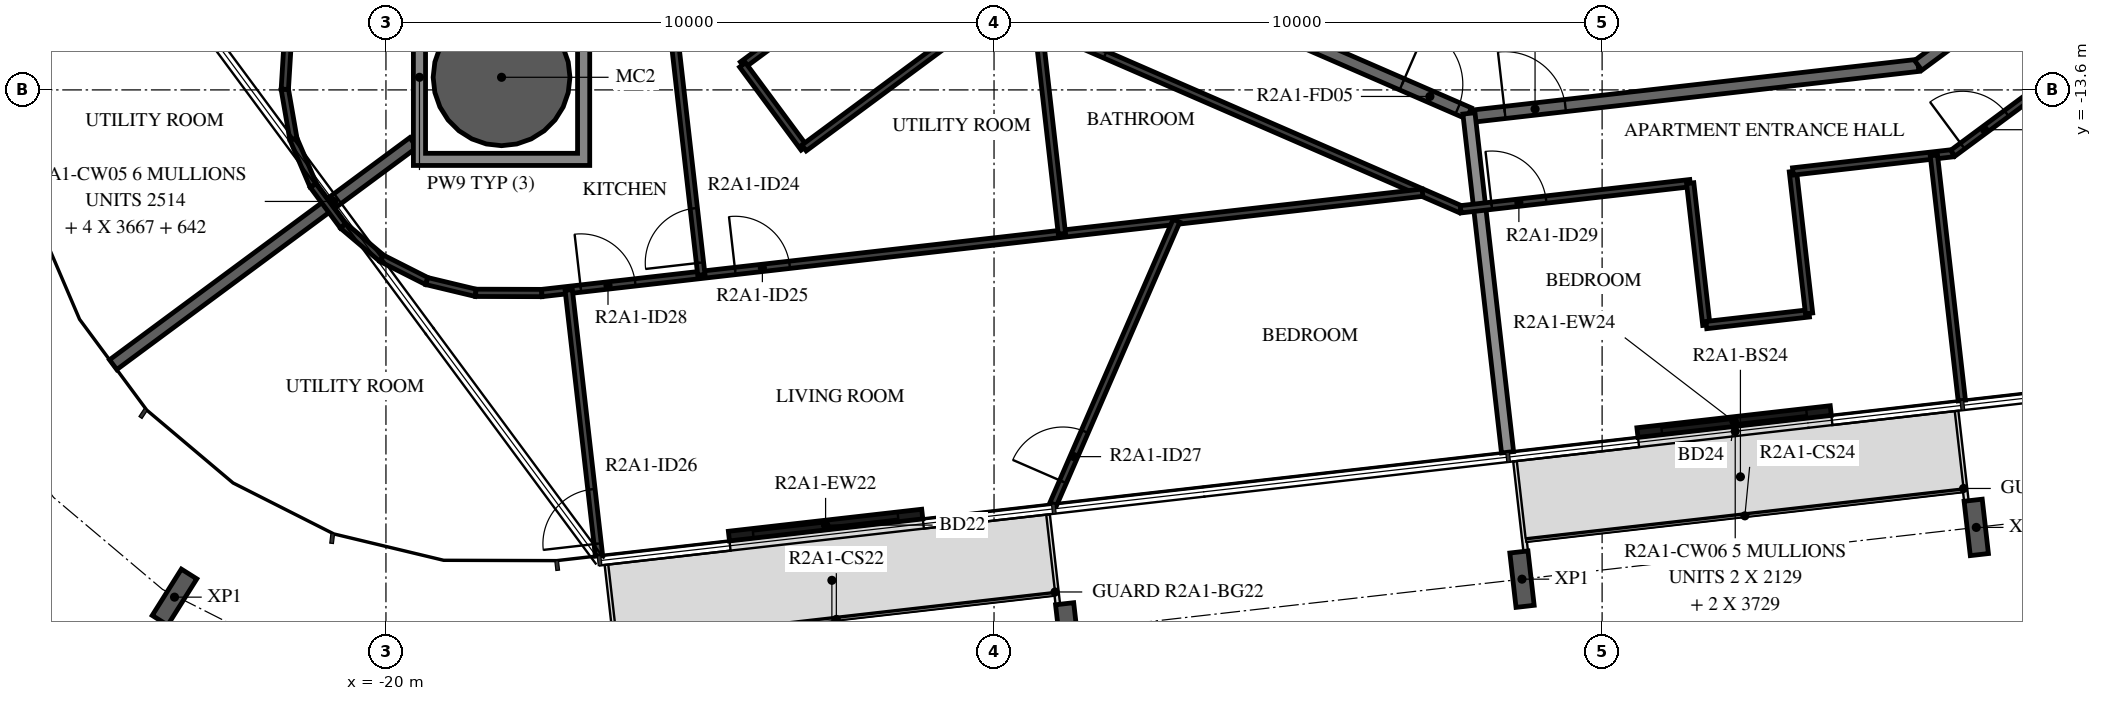
"""IFC4 building model, lengths in metres.
Left out: names, types, materials, properties, quantities, classifications, styles, units other than length and angle.
Written with IfcOpenShell. Run it as: python <this file> out.ifc"""

import sys

from ifc_helpers import new_model, si_unit, direction, frame, frame_2d, origin, origin_2d, place, context, subcontext, project, spatial, polyline, rectangle, hollow_circle, i_section, outline, extrude, element, fill, save


model = new_model("IFC4")
c1 = context("Model", 3, precision=1e-05, world=origin(), true_north=direction((0.0, 1.0)))
c2 = subcontext(c1, "Body", "Model", "MODEL_VIEW")
j1 = project(units=[si_unit("LENGTHUNIT", "METRE"), si_unit("PLANEANGLEUNIT", "RADIAN")], contexts=[c1])
p1 = place(None, origin())
s1 = spatial("IfcSite", under=j1, at=p1, CompositionType="ELEMENT")
p2 = place(p1, origin())
s2 = spatial("IfcBuilding", under=s1, at=p2, CompositionType="ELEMENT")
p3 = place(p2, frame((0.0, 0.0, 80.2)))
s3 = spatial("IfcBuildingStorey", under=s2, at=p3, CompositionType="ELEMENT", Elevation=80.2)
p4 = place(p3, frame((-18.099, -13.393, -0.38), z_axis=(0.0, 0.0, 1.0), x_axis=(1.0, 0.0, 0.0)))
e1 = element("IfcColumn", 1, at=p4, inside=s3, PredefinedType="COLUMN", context=c2, shape_type="SweptSolid", body=[
    extrude(hollow_circle(Radius=1.125, WallThickness=0.055, at=origin_2d()), origin(), (0.0, 0.0, 1.0), 3.5),
])
for number, where, z_axis, x_axis in (
    (2, (6.153, -20.795, -0.38), (0.0, 0.0, 1.0), (-0.994, -0.113, 0.0)),
    (3, (-23.477, -21.941, -0.38), (0.0, 0.0, 1.0), (-0.846, 0.532, 0.0)),
    (4, (-8.788, -22.497, -0.38), (0.0, 0.0, 1.0), (-0.994, -0.113, 0.0)),
    (5, (-1.317, -21.646, -0.38), (0.0, 0.0, 1.0), (-0.994, -0.113, 0.0)),
):
    element("IfcColumn", number, at=place(p3, frame(where, z_axis=z_axis, x_axis=x_axis)), inside=s3, PredefinedType="COLUMN", context=c2, shape_type="SweptSolid", body=[
        extrude(i_section(OverallWidth=0.3, OverallDepth=0.9, WebThickness=0.019, FlangeThickness=0.035, FilletRadius=0.03, at=origin_2d()), origin(), (0.0, 0.0, 1.0), 3.5),
    ])
p5 = place(p3, frame((-14.36, -20.938, 0.0), z_axis=(0.0, 0.0, 1.0), x_axis=(0.993569019005, 0.11322810814, 0.0)))
e6 = element("IfcWall", 6, at=p5, inside=s3, PredefinedType="STANDARD", context=c2, shape_type="SweptSolid", body=[
    extrude(rectangle(XDim=3.2, YDim=0.16, at=frame_2d((1.6, 0.0))), origin(), (0.0, 0.0, 1.0), 3.12),
])
p6 = place(p5, frame((0.4, 0.0, 0.0)))
e7 = element("IfcOpeningElement", 7, at=p6, cuts=e6, PredefinedType="OPENING", context=c2, shape_type="SweptSolid", body=[
    extrude(rectangle(XDim=2.4, YDim=2.4, at=frame_2d((1.2, 1.2))), frame((0.0, 0.09, 0.0), z_axis=(0.0, -1.0, 0.0), x_axis=(1.0, 0.0, 0.0)), (0.0, 0.0, 1.0), 0.18),
])
p7 = place(p3, frame((0.581, -19.235, 0.0), z_axis=(0.0, 0.0, 1.0), x_axis=(0.993569997097, 0.113219525124, 0.0)))
e8 = element("IfcWall", 8, at=p7, inside=s3, PredefinedType="STANDARD", context=c2, shape_type="SweptSolid", body=[
    extrude(rectangle(XDim=3.2, YDim=0.16, at=frame_2d((1.6, 0.0))), origin(), (0.0, 0.0, 1.0), 3.12),
])
p8 = place(p7, frame((0.4, 0.0, 0.0)))
e9 = element("IfcOpeningElement", 9, at=p8, cuts=e8, PredefinedType="OPENING", context=c2, shape_type="SweptSolid", body=[
    extrude(rectangle(XDim=2.4, YDim=2.4, at=frame_2d((1.2, 1.2))), frame((0.0, 0.09, 0.0), z_axis=(0.0, -1.0, 0.0), x_axis=(1.0, 0.0, 0.0)), (0.0, 0.0, 1.0), 0.18),
])
p9 = place(p3, frame((-8.829, -11.1, 0.0), z_axis=(0.0, 0.0, 1.0), x_axis=(0.917063622491, -0.398740908742, 0.0)))
e10 = element("IfcWall", 10, at=p9, inside=s3, PredefinedType="STANDARD", context=c2, shape_type="SweptSolid", body=[
    extrude(rectangle(XDim=7.24, YDim=0.2, at=frame_2d((3.62, 0.0))), origin(), (0.0, 0.0, 1.0), 3.12),
])
p10 = place(p9, frame((6.04, 0.0, 0.0)))
e11 = element("IfcOpeningElement", 11, at=p10, cuts=e10, PredefinedType="OPENING", context=c2, shape_type="SweptSolid", body=[
    extrude(rectangle(XDim=1.0, YDim=2.1, at=frame_2d((0.5, 1.05))), frame((0.0, 0.11, 0.0), z_axis=(0.0, -1.0, 0.0), x_axis=(1.0, 0.0, 0.0)), (0.0, 0.0, 1.0), 0.22),
])
p11 = place(p3, frame((-2.096, -14.028, 0.0), z_axis=(0.0, 0.0, 1.0), x_axis=(0.993569170114, 0.113226782163, 0.0)))
e12 = element("IfcWall", 12, at=p11, inside=s3, PredefinedType="STANDARD", context=c2, shape_type="SweptSolid", body=[
    extrude(rectangle(XDim=7.342, YDim=0.2, at=frame_2d((3.671, 0.0))), origin(), (0.0, 0.0, 1.0), 3.12),
])
p12 = place(p11, frame((0.5, 0.0, 0.0)))
e13 = element("IfcOpeningElement", 13, at=p12, cuts=e12, PredefinedType="OPENING", context=c2, shape_type="SweptSolid", body=[
    extrude(rectangle(XDim=1.0, YDim=2.1, at=frame_2d((0.5, 1.05))), frame((0.0, 0.11, 0.0), z_axis=(0.0, -1.0, 0.0), x_axis=(1.0, 0.0, 0.0)), (0.0, 0.0, 1.0), 0.22),
])
p13 = place(p3, frame((5.198, -13.196, 0.0), z_axis=(0.0, 0.0, 1.0), x_axis=(0.803869883159, 0.594805187394, 0.0)))
e14 = element("IfcWall", 14, at=p13, inside=s3, PredefinedType="STANDARD", context=c2, shape_type="SweptSolid", body=[
    extrude(rectangle(XDim=7.342, YDim=0.2, at=frame_2d((3.671, 0.0))), origin(), (0.0, 0.0, 1.0), 3.12),
])
p14 = place(p3, frame((-24.486, -18.119, 0.0), z_axis=(0.0, 0.0, 1.0), x_axis=(0.80384227933, 0.594842491726, 0.0)))
e15 = element("IfcWall", 15, at=p14, inside=s3, PredefinedType="STANDARD", context=c2, shape_type="SweptSolid", body=[
    extrude(rectangle(XDim=6.142, YDim=0.2, at=frame_2d((3.071, 0.0))), origin(), (0.0, 0.0, 1.0), 3.12),
])
p15 = place(p3, frame((-1.555, -19.559, 0.0), z_axis=(0.0, 0.0, 1.0), x_axis=(-0.113221250863, 0.993569800443, 0.0)))
e16 = element("IfcWall", 16, at=p15, inside=s3, PredefinedType="STANDARD", context=c2, shape_type="SweptSolid", body=[
    extrude(rectangle(XDim=5.609, YDim=0.2, at=frame_2d((2.804, 0.0))), origin(), (0.0, 0.0, 1.0), 2.73),
])
for number, where, z_axis, x_axis in (
    (17, (-20.703, -15.835, 0.0), (0.0, 0.0, 1.0), (-0.595, 0.804, 0.0)),
    (18, (-21.196, -15.168, 0.0), (0.0, 0.0, 1.0), (-0.394, 0.919, 0.0)),
):
    element("IfcWall", number, at=place(p3, frame(where, z_axis=z_axis, x_axis=x_axis)), inside=s3, PredefinedType="PARTITIONING", context=c2, shape_type="SweptSolid", body=[
        extrude(rectangle(XDim=0.829, YDim=0.12, at=frame_2d((0.415, 0.0))), origin(), (0.0, 0.0, 1.0), 3.12),
    ])
p16 = place(p3, frame((-21.522, -14.406, 0.0), z_axis=(0.0, 0.0, 1.0), x_axis=(-0.170794347099, 0.985306698952, 0.0)))
e19 = element("IfcWall", 19, at=p16, inside=s3, PredefinedType="PARTITIONING", context=c2, shape_type="SweptSolid", body=[
    extrude(rectangle(XDim=0.829, YDim=0.12, at=frame_2d((0.415, 0.0))), origin(), (0.0, 0.0, 1.0), 3.12),
])
p17 = place(p3, frame((-21.664, -13.59, 0.0), z_axis=(0.0, 0.0, 1.0), x_axis=(0.061277779288, 0.998120751095, 0.0)))
e20 = element("IfcWall", 20, at=p17, inside=s3, PredefinedType="PARTITIONING", context=c2, shape_type="SweptSolid", body=[
    extrude(rectangle(XDim=0.829, YDim=0.12, at=frame_2d((0.414, 0.0))), origin(), (0.0, 0.0, 1.0), 3.12),
])
p18 = place(p3, frame((-10.914, -10.804, 0.0), z_axis=(0.0, 0.0, 1.0), x_axis=(-0.803864616889, -0.594812304609, 0.0)))
e21 = element("IfcWall", 21, at=p18, inside=s3, PredefinedType="PARTITIONING", context=c2, shape_type="SweptSolid", body=[
    extrude(rectangle(XDim=4.008, YDim=0.12, at=frame_2d((2.004, 0.0))), origin(), (0.0, 0.0, 1.0), 3.12),
])
p19 = place(p3, frame((-14.136, -13.188, 0.0), z_axis=(0.0, 0.0, 1.0), x_axis=(0.594863421241, -0.803826791087, 0.0)))
e22 = element("IfcWall", 22, at=p19, inside=s3, PredefinedType="PARTITIONING", context=c2, shape_type="SweptSolid", body=[
    extrude(rectangle(XDim=1.7, YDim=0.12, at=frame_2d((0.85, 0.0))), origin(), (0.0, 0.0, 1.0), 3.12),
])
p20 = place(p3, frame((-13.125, -14.555, 0.0), z_axis=(0.0, 0.0, 1.0), x_axis=(0.80389374229, 0.594772940799, 0.0)))
e23 = element("IfcWall", 23, at=p20, inside=s3, PredefinedType="PARTITIONING", context=c2, shape_type="SweptSolid", body=[
    extrude(rectangle(XDim=4.008, YDim=0.12, at=frame_2d((2.004, 0.0))), origin(), (0.0, 0.0, 1.0), 3.12),
])
p21 = place(p3, frame((-9.796, -12.315, 0.0), z_axis=(0.0, 0.0, 1.0), x_axis=(0.917059572812, -0.398750222463, 0.0)))
e24 = element("IfcWall", 24, at=p21, inside=s3, PredefinedType="PARTITIONING", context=c2, shape_type="SweptSolid", body=[
    extrude(rectangle(XDim=8.146, YDim=0.12, at=frame_2d((4.073, 0.0))), origin(), (0.0, 0.0, 1.0), 3.12),
])
p22 = place(p21, frame((0.969, 0.0, 0.0)))
e25 = element("IfcOpeningElement", 25, at=p22, cuts=e24, PredefinedType="OPENING", context=c2, shape_type="SweptSolid", body=[
    extrude(rectangle(XDim=0.8, YDim=2.1, at=frame_2d((0.4, 1.05))), frame((0.0, 0.07, 0.0), z_axis=(0.0, -1.0, 0.0), x_axis=(1.0, 0.0, 0.0)), (0.0, 0.0, 1.0), 0.14),
])
p23 = place(p3, frame((-2.326, -15.563, 0.0), z_axis=(0.0, 0.0, 1.0), x_axis=(0.993575068384, 0.113175012641, 0.0)))
e26 = element("IfcWall", 26, at=p23, inside=s3, PredefinedType="PARTITIONING", context=c2, shape_type="SweptSolid", body=[
    extrude(rectangle(XDim=3.799, YDim=0.12, at=frame_2d((1.899, 0.0))), origin(), (0.0, 0.0, 1.0), 3.12),
])
p24 = place(p23, frame((0.513, 0.0, 0.0)))
e27 = element("IfcOpeningElement", 27, at=p24, cuts=e26, PredefinedType="OPENING", context=c2, shape_type="SweptSolid", body=[
    extrude(rectangle(XDim=0.9, YDim=2.1, at=frame_2d((0.45, 1.05))), frame((0.0, 0.07, 0.0), z_axis=(0.0, -1.0, 0.0), x_axis=(1.0, 0.0, 0.0)), (0.0, 0.0, 1.0), 0.14),
])
for number, where, z_axis, x_axis in (
    (28, (-20.703, -15.835, 0.0), (0.0, 0.0, 1.0), (0.764, -0.645, 0.0)),
    (29, (-20.069, -16.369, 0.0), (0.0, 0.0, 1.0), (0.892, -0.451, 0.0)),
):
    element("IfcWall", number, at=place(p3, frame(where, z_axis=z_axis, x_axis=x_axis)), inside=s3, PredefinedType="PARTITIONING", context=c2, shape_type="SweptSolid", body=[
        extrude(rectangle(XDim=0.829, YDim=0.12, at=frame_2d((0.415, 0.0))), origin(), (0.0, 0.0, 1.0), 3.12),
    ])
p25 = place(p3, frame((-19.33, -16.744, 0.0), z_axis=(0.0, 0.0, 1.0), x_axis=(0.972403343288, -0.23330610357, 0.0)))
e30 = element("IfcWall", 30, at=p25, inside=s3, PredefinedType="PARTITIONING", context=c2, shape_type="SweptSolid", body=[
    extrude(rectangle(XDim=0.829, YDim=0.12, at=frame_2d((0.415, 0.0))), origin(), (0.0, 0.0, 1.0), 3.12),
])
p26 = place(p3, frame((-18.524, -16.937, 0.0), z_axis=(0.0, 0.0, 1.0), x_axis=(0.999995736722, -0.00292002349, 0.0)))
e31 = element("IfcWall", 31, at=p26, inside=s3, PredefinedType="PARTITIONING", context=c2, shape_type="SweptSolid", body=[
    extrude(rectangle(XDim=1.087, YDim=0.12, at=frame_2d((0.543, 0.0))), origin(), (0.0, 0.0, 1.0), 3.12),
])
p27 = place(p3, frame((-17.437, -16.94, 0.0), z_axis=(0.0, 0.0, 1.0), x_axis=(0.993573314119, 0.113190412448, 0.0)))
e32 = element("IfcWall", 32, at=p27, inside=s3, PredefinedType="PARTITIONING", context=c2, shape_type="SweptSolid", body=[
    extrude(rectangle(XDim=14.576, YDim=0.12, at=frame_2d((7.288, 0.0))), origin(), (0.0, 0.0, 1.0), 3.12),
])
p28 = place(p27, frame((3.201, 0.0, 0.0)))
e33 = element("IfcOpeningElement", 33, at=p28, cuts=e32, PredefinedType="OPENING", context=c2, shape_type="SweptSolid", body=[
    extrude(rectangle(XDim=0.9, YDim=2.1, at=frame_2d((0.45, 1.05))), frame((0.0, 0.07, 0.0), z_axis=(0.0, -1.0, 0.0), x_axis=(1.0, 0.0, 0.0)), (0.0, 0.0, 1.0), 0.14),
])
p29 = place(p27, frame((0.645, 0.0, 0.0)))
e34 = element("IfcOpeningElement", 34, at=p29, cuts=e32, PredefinedType="OPENING", context=c2, shape_type="SweptSolid", body=[
    extrude(rectangle(XDim=0.9, YDim=2.1, at=frame_2d((0.45, 1.05))), frame((0.0, 0.07, 0.0), z_axis=(0.0, -1.0, 0.0), x_axis=(1.0, 0.0, 0.0)), (0.0, 0.0, 1.0), 0.14),
])
p30 = place(p3, frame((-14.813, -16.641, 0.0), z_axis=(0.0, 0.0, 1.0), x_axis=(-0.113210971478, 0.993570971767, 0.0)))
e35 = element("IfcWall", 35, at=p30, inside=s3, PredefinedType="PARTITIONING", context=c2, shape_type="SweptSolid", body=[
    extrude(rectangle(XDim=5.273, YDim=0.12, at=frame_2d((2.636, 0.0))), origin(), (0.0, 0.0, 1.0), 3.12),
])
p31 = place(p30, frame((0.2, 0.0, 0.0)))
e36 = element("IfcOpeningElement", 36, at=p31, cuts=e35, PredefinedType="OPENING", context=c2, shape_type="SweptSolid", body=[
    extrude(rectangle(XDim=0.9, YDim=2.1, at=frame_2d((0.45, 1.05))), frame((0.0, 0.07, 0.0), z_axis=(0.0, -1.0, 0.0), x_axis=(1.0, 0.0, 0.0)), (0.0, 0.0, 1.0), 0.14),
])
p32 = place(p3, frame((-16.496, -21.262, 0.0), z_axis=(0.0, 0.0, 1.0), x_axis=(-0.1132445713, 0.993567142709, 0.0)))
e37 = element("IfcWall", 37, at=p32, inside=s3, PredefinedType="PARTITIONING", context=c2, shape_type="SweptSolid", body=[
    extrude(rectangle(XDim=4.4, YDim=0.12, at=frame_2d((2.2, 0.0))), origin(), (0.0, 0.0, 1.0), 2.73),
])
p33 = place(p32, frame((0.2, 0.0, 0.0)))
e38 = element("IfcOpeningElement", 38, at=p33, cuts=e37, PredefinedType="OPENING", context=c2, shape_type="SweptSolid", body=[
    extrude(rectangle(XDim=0.9, YDim=2.1, at=frame_2d((0.45, 1.05))), frame((0.0, 0.07, 0.0), z_axis=(0.0, -1.0, 0.0), x_axis=(1.0, 0.0, 0.0)), (0.0, 0.0, 1.0), 0.14),
])
p34 = place(p3, frame((-8.884, -15.966, 0.0), z_axis=(0.0, 0.0, 1.0), x_axis=(-0.113230836929, 0.993568708026, 0.0)))
e39 = element("IfcWall", 39, at=p34, inside=s3, PredefinedType="PARTITIONING", context=c2, shape_type="SweptSolid", body=[
    extrude(rectangle(XDim=3.446, YDim=0.12, at=frame_2d((1.723, 0.0))), origin(), (0.0, 0.0, 1.0), 3.12),
])
p35 = place(p3, frame((-9.026, -20.41, 0.0), z_axis=(0.0, 0.0, 1.0), x_axis=(0.398750711167, 0.917059360316, 0.0)))
e40 = element("IfcWall", 40, at=p35, inside=s3, PredefinedType="PARTITIONING", context=c2, shape_type="SweptSolid", body=[
    extrude(rectangle(XDim=5.081, YDim=0.12, at=frame_2d((2.54, 0.0))), origin(), (0.0, 0.0, 1.0), 3.12),
])
p36 = place(p35, frame((0.4, 0.0, 0.0)))
e41 = element("IfcOpeningElement", 41, at=p36, cuts=e40, PredefinedType="OPENING", context=c2, shape_type="SweptSolid", body=[
    extrude(rectangle(XDim=0.9, YDim=2.1, at=frame_2d((0.45, 1.05))), frame((0.0, 0.07, 0.0), z_axis=(0.0, -1.0, 0.0), x_axis=(1.0, 0.0, 0.0)), (0.0, 0.0, 1.0), 0.14),
])
p37 = place(p3, frame((1.448, -15.133, 0.0), z_axis=(0.0, 0.0, 1.0), x_axis=(0.113180189053, -0.993574478741, 0.0)))
e42 = element("IfcWall", 42, at=p37, inside=s3, PredefinedType="PARTITIONING", context=c2, shape_type="SweptSolid", body=[
    extrude(rectangle(XDim=2.349, YDim=0.12, at=frame_2d((1.175, 0.0))), origin(), (0.0, 0.0, 1.0), 3.12),
])
p38 = place(p3, frame((1.714, -17.467, 0.0), z_axis=(0.0, 0.0, 1.0), x_axis=(0.993577030812, 0.113157782957, 0.0)))
e43 = element("IfcWall", 43, at=p38, inside=s3, PredefinedType="PARTITIONING", context=c2, shape_type="SweptSolid", body=[
    extrude(rectangle(XDim=1.7, YDim=0.12, at=frame_2d((0.85, 0.0))), origin(), (0.0, 0.0, 1.0), 3.12),
])
p39 = place(p3, frame((3.404, -17.275, 0.0), z_axis=(0.0, 0.0, 1.0), x_axis=(-0.113180189053, 0.993574478741, 0.0)))
e44 = element("IfcWall", 44, at=p39, inside=s3, PredefinedType="PARTITIONING", context=c2, shape_type="SweptSolid", body=[
    extrude(rectangle(XDim=2.349, YDim=0.12, at=frame_2d((1.175, 0.0))), origin(), (0.0, 0.0, 1.0), 3.12),
])
p40 = place(p3, frame((3.138, -14.941, 0.0), z_axis=(0.0, 0.0, 1.0), x_axis=(0.99356355736, 0.113276023437, 0.0)))
e45 = element("IfcWall", 45, at=p40, inside=s3, PredefinedType="PARTITIONING", context=c2, shape_type="SweptSolid", body=[
    extrude(rectangle(XDim=2.647, YDim=0.12, at=frame_2d((1.323, 0.0))), origin(), (0.0, 0.0, 1.0), 3.12),
])
p41 = place(p3, frame((5.767, -14.641, 0.0), z_axis=(0.0, 0.0, 1.0), x_axis=(0.803867427863, 0.594808505673, 0.0)))
e46 = element("IfcWall", 46, at=p41, inside=s3, PredefinedType="PARTITIONING", context=c2, shape_type="SweptSolid", body=[
    extrude(rectangle(XDim=7.316, YDim=0.12, at=frame_2d((3.658, 0.0))), origin(), (0.0, 0.0, 1.0), 3.12),
])
p42 = place(p41, frame((0.2, 0.0, 0.0)))
e47 = element("IfcOpeningElement", 47, at=p42, cuts=e46, PredefinedType="OPENING", context=c2, shape_type="SweptSolid", body=[
    extrude(rectangle(XDim=0.9, YDim=2.1, at=frame_2d((0.45, 1.05))), frame((0.0, 0.07, 0.0), z_axis=(0.0, -1.0, 0.0), x_axis=(1.0, 0.0, 0.0)), (0.0, 0.0, 1.0), 0.14),
])
p43 = place(p41, frame((5.385, 0.0, 0.0)))
e48 = element("IfcOpeningElement", 48, at=p43, cuts=e46, PredefinedType="OPENING", context=c2, shape_type="SweptSolid", body=[
    extrude(rectangle(XDim=0.8, YDim=2.1, at=frame_2d((0.4, 1.05))), frame((0.0, 0.07, 0.0), z_axis=(0.0, -1.0, 0.0), x_axis=(1.0, 0.0, 0.0)), (0.0, 0.0, 1.0), 0.14),
])
p44 = place(p3, frame((5.915, -18.708, 0.0), z_axis=(0.0, 0.0, 1.0), x_axis=(-0.113244511591, 0.993567149515, 0.0)))
e49 = element("IfcWall", 49, at=p44, inside=s3, PredefinedType="PARTITIONING", context=c2, shape_type="SweptSolid", body=[
    extrude(rectangle(XDim=4.057, YDim=0.12, at=frame_2d((2.029, 0.0))), origin(), (0.0, 0.0, 1.0), 2.73),
])
p45 = place(p3, origin())
e50 = element("IfcWall", 50, at=p45, inside=s3, PredefinedType="STANDARD", context=c2, shape_type="SweptSolid", body=[
    extrude(outline(polyline([(-16.649, -11.942), (-16.649, -14.843), (-19.549, -14.843), (-19.549, -11.942), (-16.649, -11.942)]), holes=[polyline([(-19.349, -14.643), (-16.849, -14.643), (-16.849, -12.143), (-19.349, -12.143), (-19.349, -14.643)])]), origin(), (0.0, 0.0, 1.0), 3.12),
])
p46 = place(p6, origin())
e51 = element("IfcDoor", 51, at=p46, inside=s3, OperationType="DOUBLE_DOOR_SLIDING", PredefinedType="DOOR", context=c2, shape_type="SweptSolid", body=[
    extrude(rectangle(XDim=2.4, YDim=2.4, at=frame_2d((1.2, 1.2))), frame((0.0, 0.025, 0.0), z_axis=(0.0, -1.0, 0.0), x_axis=(1.0, 0.0, 0.0)), (0.0, 0.0, 1.0), 0.05),
])
fill(e7, e51)
p47 = place(p8, origin())
e52 = element("IfcDoor", 52, at=p47, inside=s3, OperationType="DOUBLE_DOOR_SLIDING", PredefinedType="DOOR", context=c2, shape_type="SweptSolid", body=[
    extrude(rectangle(XDim=2.4, YDim=2.4, at=frame_2d((1.2, 1.2))), frame((0.0, 0.025, 0.0), z_axis=(0.0, -1.0, 0.0), x_axis=(1.0, 0.0, 0.0)), (0.0, 0.0, 1.0), 0.05),
])
fill(e9, e52)
p48 = place(p10, origin())
e53 = element("IfcDoor", 53, at=p48, inside=s3, OperationType="SINGLE_SWING_LEFT", PredefinedType="DOOR", context=c2, shape_type="SweptSolid", body=[
    extrude(rectangle(XDim=1.0, YDim=2.1, at=frame_2d((0.5, 1.05))), frame((0.0, 0.025, 0.0), z_axis=(0.0, -1.0, 0.0), x_axis=(1.0, 0.0, 0.0)), (0.0, 0.0, 1.0), 0.05),
])
fill(e11, e53)
p49 = place(p22, origin())
e54 = element("IfcDoor", 54, at=p49, inside=s3, OperationType="SINGLE_SWING_LEFT", PredefinedType="DOOR", context=c2, shape_type="SweptSolid", body=[
    extrude(rectangle(XDim=0.8, YDim=2.1, at=frame_2d((0.4, 1.05))), frame((0.0, 0.025, 0.0), z_axis=(0.0, -1.0, 0.0), x_axis=(1.0, 0.0, 0.0)), (0.0, 0.0, 1.0), 0.05),
])
fill(e25, e54)
p50 = place(p31, origin())
e55 = element("IfcDoor", 55, at=p50, inside=s3, OperationType="SINGLE_SWING_LEFT", PredefinedType="DOOR", context=c2, shape_type="SweptSolid", body=[
    extrude(rectangle(XDim=0.9, YDim=2.1, at=frame_2d((0.45, 1.05))), frame((0.0, 0.025, 0.0), z_axis=(0.0, -1.0, 0.0), x_axis=(1.0, 0.0, 0.0)), (0.0, 0.0, 1.0), 0.05),
])
fill(e36, e55)
p51 = place(p28, origin())
e56 = element("IfcDoor", 56, at=p51, inside=s3, OperationType="SINGLE_SWING_LEFT", PredefinedType="DOOR", context=c2, shape_type="SweptSolid", body=[
    extrude(rectangle(XDim=0.9, YDim=2.1, at=frame_2d((0.45, 1.05))), frame((0.0, 0.025, 0.0), z_axis=(0.0, -1.0, 0.0), x_axis=(1.0, 0.0, 0.0)), (0.0, 0.0, 1.0), 0.05),
])
fill(e33, e56)
p52 = place(p33, origin())
e57 = element("IfcDoor", 57, at=p52, inside=s3, OperationType="SINGLE_SWING_LEFT", PredefinedType="DOOR", context=c2, shape_type="SweptSolid", body=[
    extrude(rectangle(XDim=0.9, YDim=2.1, at=frame_2d((0.45, 1.05))), frame((0.0, 0.025, 0.0), z_axis=(0.0, -1.0, 0.0), x_axis=(1.0, 0.0, 0.0)), (0.0, 0.0, 1.0), 0.05),
])
fill(e38, e57)
p53 = place(p36, origin())
e58 = element("IfcDoor", 58, at=p53, inside=s3, OperationType="SINGLE_SWING_RIGHT", PredefinedType="DOOR", context=c2, shape_type="SweptSolid", body=[
    extrude(rectangle(XDim=0.9, YDim=2.1, at=frame_2d((0.45, 1.05))), frame((0.0, 0.025, 0.0), z_axis=(0.0, -1.0, 0.0), x_axis=(1.0, 0.0, 0.0)), (0.0, 0.0, 1.0), 0.05),
])
fill(e41, e58)
p54 = place(p29, origin())
e59 = element("IfcDoor", 59, at=p54, inside=s3, OperationType="SINGLE_SWING_RIGHT", PredefinedType="DOOR", context=c2, shape_type="SweptSolid", body=[
    extrude(rectangle(XDim=0.9, YDim=2.1, at=frame_2d((0.45, 1.05))), frame((0.0, 0.025, 0.0), z_axis=(0.0, -1.0, 0.0), x_axis=(1.0, 0.0, 0.0)), (0.0, 0.0, 1.0), 0.05),
])
fill(e34, e59)
p55 = place(p12, origin())
e60 = element("IfcDoor", 60, at=p55, inside=s3, OperationType="SINGLE_SWING_LEFT", PredefinedType="DOOR", context=c2, shape_type="SweptSolid", body=[
    extrude(rectangle(XDim=1.0, YDim=2.1, at=frame_2d((0.5, 1.05))), frame((0.0, 0.025, 0.0), z_axis=(0.0, -1.0, 0.0), x_axis=(1.0, 0.0, 0.0)), (0.0, 0.0, 1.0), 0.05),
])
fill(e13, e60)
p56 = place(p24, origin())
e61 = element("IfcDoor", 61, at=p56, inside=s3, OperationType="SINGLE_SWING_LEFT", PredefinedType="DOOR", context=c2, shape_type="SweptSolid", body=[
    extrude(rectangle(XDim=0.9, YDim=2.1, at=frame_2d((0.45, 1.05))), frame((0.0, 0.025, 0.0), z_axis=(0.0, -1.0, 0.0), x_axis=(1.0, 0.0, 0.0)), (0.0, 0.0, 1.0), 0.05),
])
fill(e27, e61)
p57 = place(p42, origin())
e62 = element("IfcDoor", 62, at=p57, inside=s3, OperationType="SINGLE_SWING_RIGHT", PredefinedType="DOOR", context=c2, shape_type="SweptSolid", body=[
    extrude(rectangle(XDim=0.9, YDim=2.1, at=frame_2d((0.45, 1.05))), frame((0.0, 0.025, 0.0), z_axis=(0.0, -1.0, 0.0), x_axis=(1.0, 0.0, 0.0)), (0.0, 0.0, 1.0), 0.05),
])
fill(e47, e62)
save(model, sys.argv[1])
